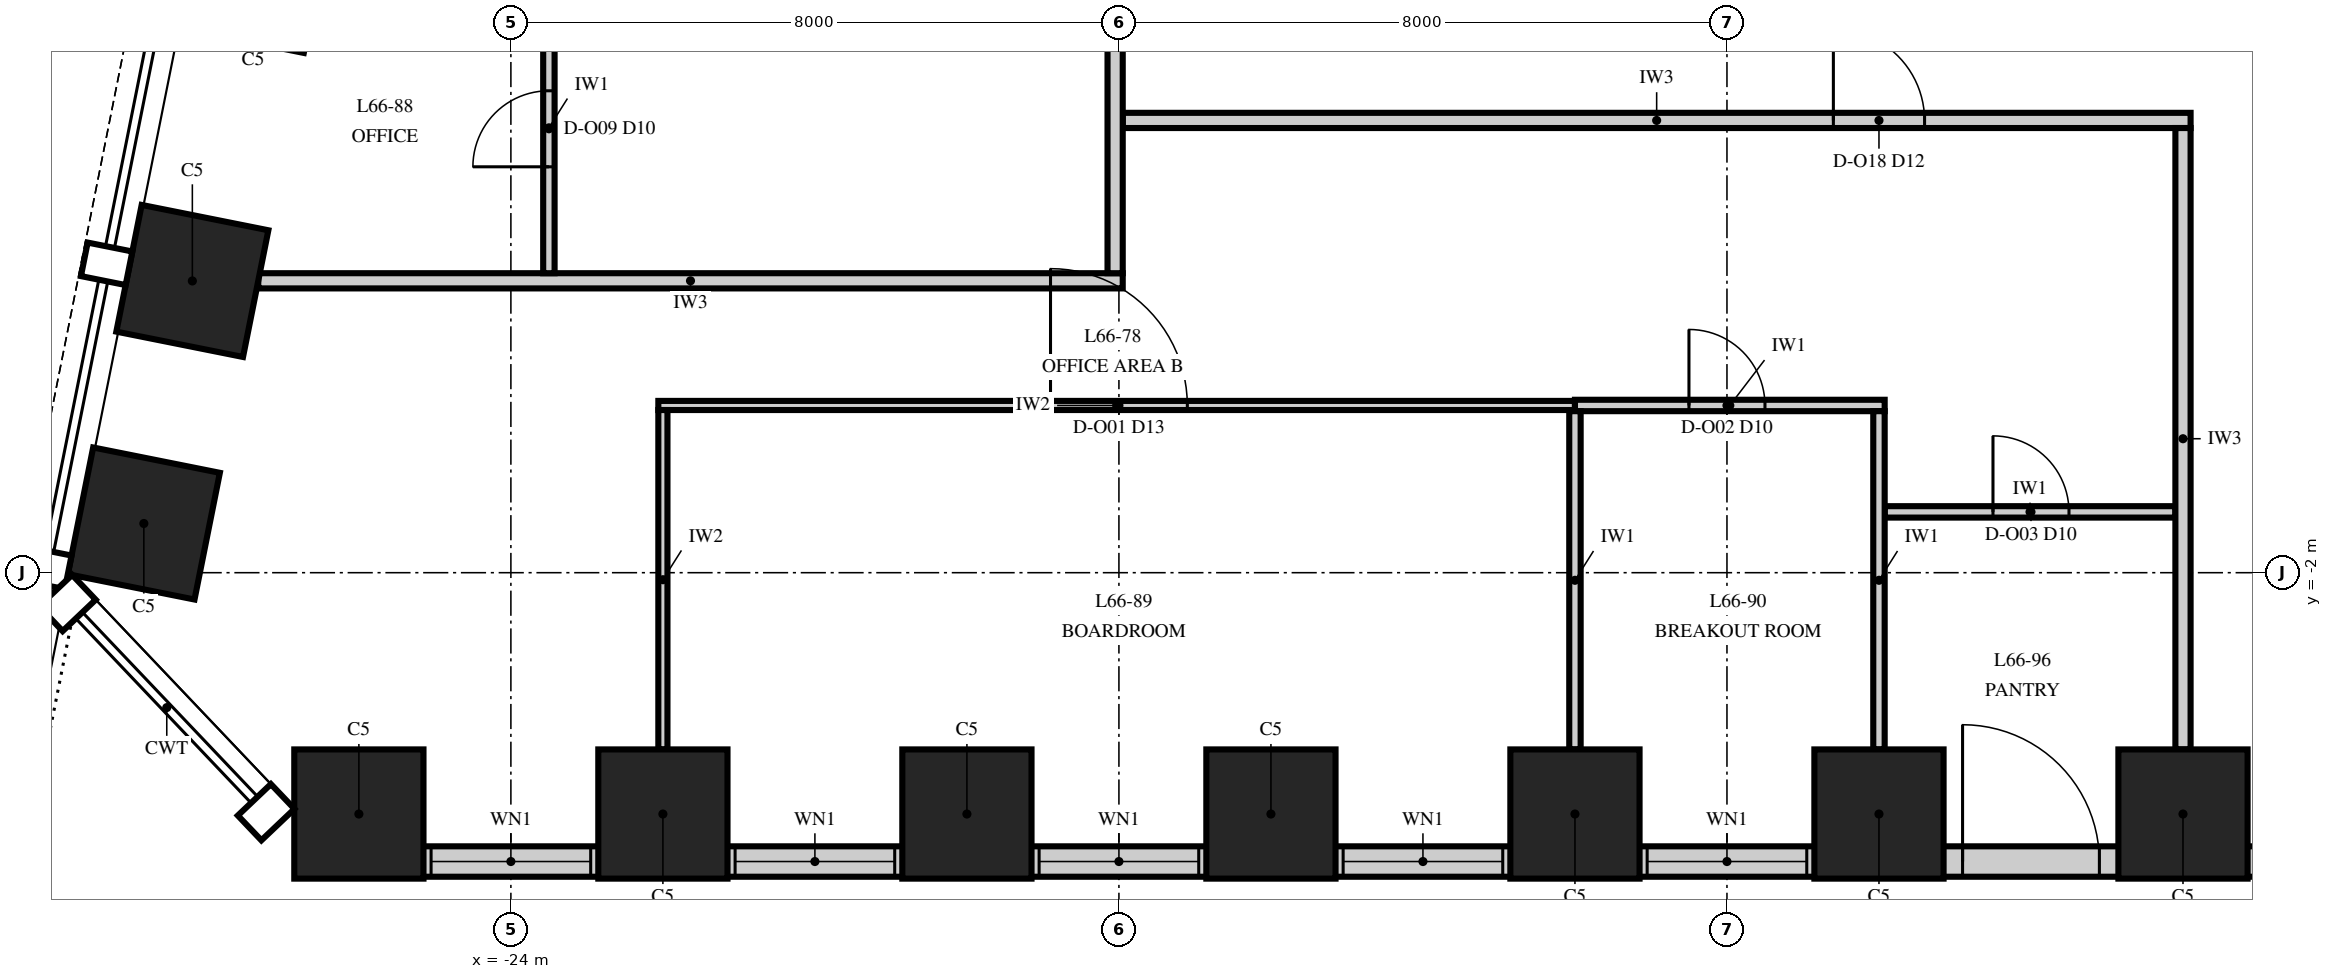
"""IFC4 building model, lengths in metres.
Left out: names, types, materials, properties, quantities, classifications, styles, units other than length and angle.
Written with IfcOpenShell. Run it as: python <this file> out.ifc"""

import sys

from ifc_helpers import new_model, si_unit, direction, frame, frame_2d, origin, origin_2d, place, context, subcontext, project, spatial, rectangle, extrude, element, fill, save


model = new_model("IFC4")
c1 = context("Model", 3, precision=1e-05, world=origin(), true_north=direction((0.0, 1.0)))
c2 = subcontext(c1, "Body", "Model", "MODEL_VIEW")
j1 = project(units=[si_unit("LENGTHUNIT", "METRE"), si_unit("PLANEANGLEUNIT", "RADIAN")], contexts=[c1])
p1 = place(None, origin())
s1 = spatial("IfcSite", under=j1, at=p1, CompositionType="ELEMENT")
p2 = place(p1, origin())
s2 = spatial("IfcBuilding", under=s1, at=p2, CompositionType="ELEMENT")
p3 = place(p2, frame((0.0, 0.0, 284.0)))
s3 = spatial("IfcBuildingStorey", under=s2, at=p3, CompositionType="ELEMENT", Elevation=284.0)
for number, where, z_axis, x_axis in (
    (1, (-26.0, -5.175, 0.0), (0.0, 0.0, 1.0), (1.0, 0.0, 0.0)),
    (2, (-22.0, -5.175, 0.0), (0.0, 0.0, 1.0), (1.0, 0.0, 0.0)),
    (3, (-18.0, -5.175, 0.0), (0.0, 0.0, 1.0), (1.0, 0.0, 0.0)),
    (4, (-14.0, -5.175, 0.0), (0.0, 0.0, 1.0), (1.0, 0.0, 0.0)),
    (5, (-10.0, -5.175, 0.0), (0.0, 0.0, 1.0), (1.0, 0.0, 0.0)),
    (6, (-6.0, -5.175, 0.0), (0.0, 0.0, 1.0), (1.0, 0.0, 0.0)),
    (7, (-2.0, -5.175, 0.0), (0.0, 0.0, 1.0), (1.0, 0.0, 0.0)),
    (8, (-27.391, 5.838, 0.0), (0.0, 0.0, 1.0), (-0.196, -0.981, 0.0)),
    (9, (-28.191, 1.838, 0.0), (0.0, 0.0, 1.0), (-0.196, -0.981, 0.0)),
    (10, (-28.829, -1.353, 0.0), (0.0, 0.0, 1.0), (-0.196, -0.981, 0.0)),
):
    element("IfcColumn", number, at=place(p3, frame(where, z_axis=z_axis, x_axis=x_axis)), inside=s3, PredefinedType="COLUMN", context=c2, shape_type="SweptSolid", body=[
        extrude(rectangle(XDim=1.7, YDim=1.7, at=origin_2d()), origin(), (0.0, 0.0, 1.0), 4.0),
    ])
p4 = place(p3, frame((-26.0, -5.8, 0.0), z_axis=(0.0, 0.0, 1.0), x_axis=(1.0, 0.0, 0.0)))
e11 = element("IfcWall", 11, at=p4, inside=s3, PredefinedType="SOLIDWALL", context=c2, shape_type="SweptSolid", body=[
    extrude(rectangle(XDim=52.0, YDim=0.4, at=frame_2d((26.0, 0.0))), origin(), (0.0, 0.0, 1.0), 2.0),
])
p5 = place(p4, frame((0.95, 0.0, 0.8)))
e12 = element("IfcOpeningElement", 12, at=p5, cuts=e11, PredefinedType="OPENING", context=c2, shape_type="SweptSolid", body=[
    extrude(rectangle(XDim=2.1, YDim=1.15, at=frame_2d((1.05, 0.575))), frame((0.0, 0.215, 0.0), z_axis=(0.0, -1.0, 0.0), x_axis=(1.0, 0.0, 0.0)), (0.0, 0.0, 1.0), 0.43),
])
p6 = place(p4, frame((4.95, 0.0, 0.8)))
e13 = element("IfcOpeningElement", 13, at=p6, cuts=e11, PredefinedType="OPENING", context=c2, shape_type="SweptSolid", body=[
    extrude(rectangle(XDim=2.1, YDim=1.15, at=frame_2d((1.05, 0.575))), frame((0.0, 0.215, 0.0), z_axis=(0.0, -1.0, 0.0), x_axis=(1.0, 0.0, 0.0)), (0.0, 0.0, 1.0), 0.43),
])
p7 = place(p4, frame((8.95, 0.0, 0.8)))
e14 = element("IfcOpeningElement", 14, at=p7, cuts=e11, PredefinedType="OPENING", context=c2, shape_type="SweptSolid", body=[
    extrude(rectangle(XDim=2.1, YDim=1.15, at=frame_2d((1.05, 0.575))), frame((0.0, 0.215, 0.0), z_axis=(0.0, -1.0, 0.0), x_axis=(1.0, 0.0, 0.0)), (0.0, 0.0, 1.0), 0.43),
])
p8 = place(p4, frame((12.95, 0.0, 0.8)))
e15 = element("IfcOpeningElement", 15, at=p8, cuts=e11, PredefinedType="OPENING", context=c2, shape_type="SweptSolid", body=[
    extrude(rectangle(XDim=2.1, YDim=1.15, at=frame_2d((1.05, 0.575))), frame((0.0, 0.215, 0.0), z_axis=(0.0, -1.0, 0.0), x_axis=(1.0, 0.0, 0.0)), (0.0, 0.0, 1.0), 0.43),
])
p9 = place(p4, frame((16.95, 0.0, 0.8)))
e16 = element("IfcOpeningElement", 16, at=p9, cuts=e11, PredefinedType="OPENING", context=c2, shape_type="SweptSolid", body=[
    extrude(rectangle(XDim=2.1, YDim=1.15, at=frame_2d((1.05, 0.575))), frame((0.0, 0.215, 0.0), z_axis=(0.0, -1.0, 0.0), x_axis=(1.0, 0.0, 0.0)), (0.0, 0.0, 1.0), 0.43),
])
p10 = place(p4, frame((21.1, 0.0, 0.0)))
e17 = element("IfcOpeningElement", 17, at=p10, cuts=e11, PredefinedType="OPENING", context=c2, shape_type="SweptSolid", body=[
    extrude(rectangle(XDim=1.8, YDim=2.0, at=frame_2d((0.9, 1.0))), frame((0.0, 0.215, 0.0), z_axis=(0.0, -1.0, 0.0), x_axis=(1.0, 0.0, 0.0)), (0.0, 0.0, 1.0), 0.43),
])
p11 = place(p4, frame((24.95, 0.0, 0.8)))
e18 = element("IfcOpeningElement", 18, at=p11, cuts=e11, PredefinedType="OPENING", context=c2, shape_type="SweptSolid", body=[
    extrude(rectangle(XDim=2.1, YDim=1.15, at=frame_2d((1.05, 0.575))), frame((0.0, 0.215, 0.0), z_axis=(0.0, -1.0, 0.0), x_axis=(1.0, 0.0, 0.0)), (0.0, 0.0, 1.0), 0.43),
])
p12 = place(p4, frame((29.1, 0.0, 0.0)))
e19 = element("IfcOpeningElement", 19, at=p12, cuts=e11, PredefinedType="OPENING", context=c2, shape_type="SweptSolid", body=[
    extrude(rectangle(XDim=1.8, YDim=2.0, at=frame_2d((0.9, 1.0))), frame((0.0, 0.215, 0.0), z_axis=(0.0, -1.0, 0.0), x_axis=(1.0, 0.0, 0.0)), (0.0, 0.0, 1.0), 0.43),
])
p13 = place(p4, frame((32.95, 0.0, 0.8)))
e20 = element("IfcOpeningElement", 20, at=p13, cuts=e11, PredefinedType="OPENING", context=c2, shape_type="SweptSolid", body=[
    extrude(rectangle(XDim=2.1, YDim=1.15, at=frame_2d((1.05, 0.575))), frame((0.0, 0.215, 0.0), z_axis=(0.0, -1.0, 0.0), x_axis=(1.0, 0.0, 0.0)), (0.0, 0.0, 1.0), 0.43),
])
p14 = place(p4, frame((36.95, 0.0, 0.8)))
e21 = element("IfcOpeningElement", 21, at=p14, cuts=e11, PredefinedType="OPENING", context=c2, shape_type="SweptSolid", body=[
    extrude(rectangle(XDim=2.1, YDim=1.15, at=frame_2d((1.05, 0.575))), frame((0.0, 0.215, 0.0), z_axis=(0.0, -1.0, 0.0), x_axis=(1.0, 0.0, 0.0)), (0.0, 0.0, 1.0), 0.43),
])
p15 = place(p4, frame((40.95, 0.0, 0.8)))
e22 = element("IfcOpeningElement", 22, at=p15, cuts=e11, PredefinedType="OPENING", context=c2, shape_type="SweptSolid", body=[
    extrude(rectangle(XDim=2.1, YDim=1.15, at=frame_2d((1.05, 0.575))), frame((0.0, 0.215, 0.0), z_axis=(0.0, -1.0, 0.0), x_axis=(1.0, 0.0, 0.0)), (0.0, 0.0, 1.0), 0.43),
])
p16 = place(p4, frame((44.95, 0.0, 0.8)))
e23 = element("IfcOpeningElement", 23, at=p16, cuts=e11, PredefinedType="OPENING", context=c2, shape_type="SweptSolid", body=[
    extrude(rectangle(XDim=2.1, YDim=1.15, at=frame_2d((1.05, 0.575))), frame((0.0, 0.215, 0.0), z_axis=(0.0, -1.0, 0.0), x_axis=(1.0, 0.0, 0.0)), (0.0, 0.0, 1.0), 0.43),
])
p17 = place(p4, frame((48.95, 0.0, 0.8)))
e24 = element("IfcOpeningElement", 24, at=p17, cuts=e11, PredefinedType="OPENING", context=c2, shape_type="SweptSolid", body=[
    extrude(rectangle(XDim=2.1, YDim=1.15, at=frame_2d((1.05, 0.575))), frame((0.0, 0.215, 0.0), z_axis=(0.0, -1.0, 0.0), x_axis=(1.0, 0.0, 0.0)), (0.0, 0.0, 1.0), 0.43),
])
p18 = place(p3, frame((-5.925, -1.2, 0.0), z_axis=(0.0, 0.0, 1.0), x_axis=(1.0, 0.0, 0.0)))
e25 = element("IfcWall", 25, at=p18, inside=s3, PredefinedType="PARTITIONING", context=c2, shape_type="SweptSolid", body=[
    extrude(rectangle(XDim=3.825, YDim=0.15, at=frame_2d((1.913, 0.0))), origin(), (0.0, 0.0, 1.0), 3.23),
])
p19 = place(p18, frame((1.425, 0.0, 0.0)))
e26 = element("IfcOpeningElement", 26, at=p19, cuts=e25, PredefinedType="OPENING", context=c2, shape_type="SweptSolid", body=[
    extrude(rectangle(XDim=1.0, YDim=2.3, at=frame_2d((0.5, 1.15))), frame((0.0, 0.09, 0.0), z_axis=(0.0, -1.0, 0.0), x_axis=(1.0, 0.0, 0.0)), (0.0, 0.0, 1.0), 0.18),
])
p20 = place(p3, frame((-22.06, 0.2, 0.0), z_axis=(0.0, 0.0, 1.0), x_axis=(1.0, 0.0, 0.0)))
e27 = element("IfcWall", 27, at=p20, inside=s3, PredefinedType="PARTITIONING", context=c2, shape_type="SweptSolid", body=[
    extrude(rectangle(XDim=12.06, YDim=0.12, at=frame_2d((6.03, 0.0))), origin(), (0.0, 0.0, 1.0), 3.23),
])
p21 = place(p20, frame((5.16, 0.0, 0.0)))
e28 = element("IfcOpeningElement", 28, at=p21, cuts=e27, PredefinedType="OPENING", context=c2, shape_type="SweptSolid", body=[
    extrude(rectangle(XDim=1.8, YDim=2.4, at=frame_2d((0.9, 1.2))), frame((0.0, 0.075, 0.0), z_axis=(0.0, -1.0, 0.0), x_axis=(1.0, 0.0, 0.0)), (0.0, 0.0, 1.0), 0.15),
])
p22 = place(p3, frame((-10.0, 0.2, 0.0), z_axis=(0.0, 0.0, 1.0), x_axis=(1.0, 0.0, 0.0)))
e29 = element("IfcWall", 29, at=p22, inside=s3, PredefinedType="PARTITIONING", context=c2, shape_type="SweptSolid", body=[
    extrude(rectangle(XDim=4.075, YDim=0.15, at=frame_2d((2.038, 0.0))), origin(), (0.0, 0.0, 1.0), 3.85),
])
p23 = place(p22, frame((1.5, 0.0, 0.0)))
e30 = element("IfcOpeningElement", 30, at=p23, cuts=e29, PredefinedType="OPENING", context=c2, shape_type="SweptSolid", body=[
    extrude(rectangle(XDim=1.0, YDim=2.3, at=frame_2d((0.5, 1.15))), frame((0.0, 0.09, 0.0), z_axis=(0.0, -1.0, 0.0), x_axis=(1.0, 0.0, 0.0)), (0.0, 0.0, 1.0), 0.18),
])
p24 = place(p3, frame((-27.324, 1.84, 0.0), z_axis=(0.0, 0.0, 1.0), x_axis=(1.0, 0.0, 0.0)))
e31 = element("IfcWall", 31, at=p24, inside=s3, PredefinedType="PARTITIONING", context=c2, shape_type="SweptSolid", body=[
    extrude(rectangle(XDim=11.374, YDim=0.2, at=frame_2d((5.687, 0.0))), origin(), (0.0, 0.0, 1.0), 3.23),
])
p25 = place(p3, frame((-15.95, 3.95, 0.0), z_axis=(0.0, 0.0, 1.0), x_axis=(1.0, 0.0, 0.0)))
e32 = element("IfcWall", 32, at=p25, inside=s3, PredefinedType="PARTITIONING", context=c2, shape_type="SweptSolid", body=[
    extrude(rectangle(XDim=14.05, YDim=0.2, at=frame_2d((7.025, 0.0))), origin(), (0.0, 0.0, 1.0), 3.23),
])
p26 = place(p25, frame((9.35, 0.0, 0.0)))
e33 = element("IfcOpeningElement", 33, at=p26, cuts=e32, PredefinedType="OPENING", context=c2, shape_type="SweptSolid", body=[
    extrude(rectangle(XDim=1.2, YDim=2.4, at=frame_2d((0.6, 1.2))), frame((0.0, 0.115, 0.0), z_axis=(0.0, -1.0, 0.0), x_axis=(1.0, 0.0, 0.0)), (0.0, 0.0, 1.0), 0.23),
])
p27 = place(p3, frame((-23.5, 1.94, 0.0), z_axis=(0.0, 0.0, 1.0), x_axis=(0.0, 1.0, 0.0)))
e34 = element("IfcWall", 34, at=p27, inside=s3, PredefinedType="PARTITIONING", context=c2, shape_type="SweptSolid", body=[
    extrude(rectangle(XDim=3.825, YDim=0.15, at=frame_2d((1.913, 0.0))), origin(), (0.0, 0.0, 1.0), 3.85),
])
p28 = place(p27, frame((1.4, 0.0, 0.0)))
e35 = element("IfcOpeningElement", 35, at=p28, cuts=e34, PredefinedType="OPENING", context=c2, shape_type="SweptSolid", body=[
    extrude(rectangle(XDim=1.0, YDim=2.3, at=frame_2d((0.5, 1.15))), frame((0.0, 0.09, 0.0), z_axis=(0.0, -1.0, 0.0), x_axis=(1.0, 0.0, 0.0)), (0.0, 0.0, 1.0), 0.18),
])
p29 = place(p3, frame((-22.0, -4.325, 0.0), z_axis=(0.0, 0.0, 1.0), x_axis=(0.0, 1.0, 0.0)))
e36 = element("IfcWall", 36, at=p29, inside=s3, PredefinedType="PARTITIONING", context=c2, shape_type="SweptSolid", body=[
    extrude(rectangle(XDim=4.465, YDim=0.12, at=frame_2d((2.232, 0.0))), origin(), (0.0, 0.0, 1.0), 3.23),
])
p30 = place(p3, frame((-16.05, 1.94, 0.0), z_axis=(0.0, 0.0, 1.0), x_axis=(0.0, 1.0, 0.0)))
e37 = element("IfcWall", 37, at=p30, inside=s3, PredefinedType="PARTITIONING", context=c2, shape_type="SweptSolid", body=[
    extrude(rectangle(XDim=24.01, YDim=0.2, at=frame_2d((12.005, 0.0))), origin(), (0.0, 0.0, 1.0), 2.842),
])
p31 = place(p30, frame((8.46, 0.0, 0.0)))
e38 = element("IfcOpeningElement", 38, at=p31, cuts=e37, PredefinedType="OPENING", context=c2, shape_type="SweptSolid", body=[
    extrude(rectangle(XDim=1.2, YDim=2.4, at=frame_2d((0.6, 1.2))), frame((0.0, 0.115, 0.0), z_axis=(0.0, -1.0, 0.0), x_axis=(1.0, 0.0, 0.0)), (0.0, 0.0, 1.0), 0.23),
])
p32 = place(p30, frame((22.46, 0.0, 0.0)))
e39 = element("IfcOpeningElement", 39, at=p32, cuts=e37, PredefinedType="OPENING", context=c2, shape_type="SweptSolid", body=[
    extrude(rectangle(XDim=1.2, YDim=2.4, at=frame_2d((0.6, 1.2))), frame((0.0, 0.115, 0.0), z_axis=(0.0, -1.0, 0.0), x_axis=(1.0, 0.0, 0.0)), (0.0, 0.0, 1.0), 0.23),
])
for number, where, z_axis, x_axis in (
    (40, (-10.0, -4.325, 0.0), (0.0, 0.0, 1.0), (0.0, 1.0, 0.0)),
    (41, (-6.0, -4.325, 0.0), (0.0, 0.0, 1.0), (0.0, 1.0, 0.0)),
):
    element("IfcWall", number, at=place(p3, frame(where, z_axis=z_axis, x_axis=x_axis)), inside=s3, PredefinedType="PARTITIONING", context=c2, shape_type="SweptSolid", body=[
        extrude(rectangle(XDim=4.45, YDim=0.15, at=frame_2d((2.225, 0.0))), origin(), (0.0, 0.0, 1.0), 3.23),
    ])
p33 = place(p3, frame((-2.0, -4.325, 0.0), z_axis=(0.0, 0.0, 1.0), x_axis=(0.0, 1.0, 0.0)))
e42 = element("IfcWall", 42, at=p33, inside=s3, PredefinedType="PARTITIONING", context=c2, shape_type="SweptSolid", body=[
    extrude(rectangle(XDim=8.175, YDim=0.2, at=frame_2d((4.087, 0.0))), origin(), (0.0, 0.0, 1.0), 3.23),
])
p34 = place(p5, origin())
e43 = element("IfcWindow", 43, at=p34, inside=s3, PartitioningType="SINGLE_PANEL", PredefinedType="WINDOW", context=c2, shape_type="SweptSolid", body=[
    extrude(rectangle(XDim=2.1, YDim=1.15, at=frame_2d((1.05, 0.575))), frame((0.0, 0.03, 0.0), z_axis=(0.0, -1.0, 0.0), x_axis=(1.0, 0.0, 0.0)), (0.0, 0.0, 1.0), 0.06),
])
fill(e12, e43)
p35 = place(p6, origin())
e44 = element("IfcWindow", 44, at=p35, inside=s3, PartitioningType="SINGLE_PANEL", PredefinedType="WINDOW", context=c2, shape_type="SweptSolid", body=[
    extrude(rectangle(XDim=2.1, YDim=1.15, at=frame_2d((1.05, 0.575))), frame((0.0, 0.03, 0.0), z_axis=(0.0, -1.0, 0.0), x_axis=(1.0, 0.0, 0.0)), (0.0, 0.0, 1.0), 0.06),
])
fill(e13, e44)
p36 = place(p7, origin())
e45 = element("IfcWindow", 45, at=p36, inside=s3, PartitioningType="SINGLE_PANEL", PredefinedType="WINDOW", context=c2, shape_type="SweptSolid", body=[
    extrude(rectangle(XDim=2.1, YDim=1.15, at=frame_2d((1.05, 0.575))), frame((0.0, 0.03, 0.0), z_axis=(0.0, -1.0, 0.0), x_axis=(1.0, 0.0, 0.0)), (0.0, 0.0, 1.0), 0.06),
])
fill(e14, e45)
p37 = place(p8, origin())
e46 = element("IfcWindow", 46, at=p37, inside=s3, PartitioningType="SINGLE_PANEL", PredefinedType="WINDOW", context=c2, shape_type="SweptSolid", body=[
    extrude(rectangle(XDim=2.1, YDim=1.15, at=frame_2d((1.05, 0.575))), frame((0.0, 0.03, 0.0), z_axis=(0.0, -1.0, 0.0), x_axis=(1.0, 0.0, 0.0)), (0.0, 0.0, 1.0), 0.06),
])
fill(e15, e46)
p38 = place(p9, origin())
e47 = element("IfcWindow", 47, at=p38, inside=s3, PartitioningType="SINGLE_PANEL", PredefinedType="WINDOW", context=c2, shape_type="SweptSolid", body=[
    extrude(rectangle(XDim=2.1, YDim=1.15, at=frame_2d((1.05, 0.575))), frame((0.0, 0.03, 0.0), z_axis=(0.0, -1.0, 0.0), x_axis=(1.0, 0.0, 0.0)), (0.0, 0.0, 1.0), 0.06),
])
fill(e16, e47)
p39 = place(p10, origin())
e48 = element("IfcDoor", 48, at=p39, inside=s3, OperationType="DOUBLE_DOOR_SINGLE_SWING", PredefinedType="DOOR", context=c2, shape_type="SweptSolid", body=[
    extrude(rectangle(XDim=1.8, YDim=2.0, at=frame_2d((0.9, 1.0))), frame((0.0, 0.2, 0.0), z_axis=(0.0, -1.0, 0.0), x_axis=(1.0, 0.0, 0.0)), (0.0, 0.0, 1.0), 0.399),
])
fill(e17, e48)
p40 = place(p21, origin())
e49 = element("IfcDoor", 49, at=p40, inside=s3, OperationType="DOUBLE_DOOR_SINGLE_SWING", PredefinedType="DOOR", context=c2, shape_type="SweptSolid", body=[
    extrude(rectangle(XDim=1.8, YDim=2.4, at=frame_2d((0.9, 1.2))), frame((0.0, 0.06, 0.0), z_axis=(0.0, -1.0, 0.0), x_axis=(1.0, 0.0, 0.0)), (0.0, 0.0, 1.0), 0.12),
])
fill(e28, e49)
p41 = place(p23, origin())
e50 = element("IfcDoor", 50, at=p41, inside=s3, OperationType="SINGLE_SWING_LEFT", PredefinedType="DOOR", context=c2, shape_type="SweptSolid", body=[
    extrude(rectangle(XDim=1.0, YDim=2.3, at=frame_2d((0.5, 1.15))), frame((0.0, 0.075, 0.0), z_axis=(0.0, -1.0, 0.0), x_axis=(1.0, 0.0, 0.0)), (0.0, 0.0, 1.0), 0.149),
])
fill(e30, e50)
p42 = place(p19, origin())
e51 = element("IfcDoor", 51, at=p42, inside=s3, OperationType="SINGLE_SWING_LEFT", PredefinedType="DOOR", context=c2, shape_type="SweptSolid", body=[
    extrude(rectangle(XDim=1.0, YDim=2.3, at=frame_2d((0.5, 1.15))), frame((0.0, 0.075, 0.0), z_axis=(0.0, -1.0, 0.0), x_axis=(1.0, 0.0, 0.0)), (0.0, 0.0, 1.0), 0.149),
])
fill(e26, e51)
p43 = place(p28, origin())
e52 = element("IfcDoor", 52, at=p43, inside=s3, OperationType="SINGLE_SWING_LEFT", PredefinedType="DOOR", context=c2, shape_type="SweptSolid", body=[
    extrude(rectangle(XDim=1.0, YDim=2.3, at=frame_2d((0.5, 1.15))), frame((0.0, 0.075, 0.0), z_axis=(0.0, -1.0, 0.0), x_axis=(1.0, 0.0, 0.0)), (0.0, 0.0, 1.0), 0.149),
])
fill(e35, e52)
p44 = place(p26, origin())
e53 = element("IfcDoor", 53, at=p44, inside=s3, OperationType="SINGLE_SWING_LEFT", PredefinedType="DOOR", context=c2, shape_type="SweptSolid", body=[
    extrude(rectangle(XDim=1.2, YDim=2.4, at=frame_2d((0.6, 1.2))), frame((0.0, 0.1, 0.0), z_axis=(0.0, -1.0, 0.0), x_axis=(1.0, 0.0, 0.0)), (0.0, 0.0, 1.0), 0.199),
])
fill(e33, e53)
save(model, sys.argv[1])
